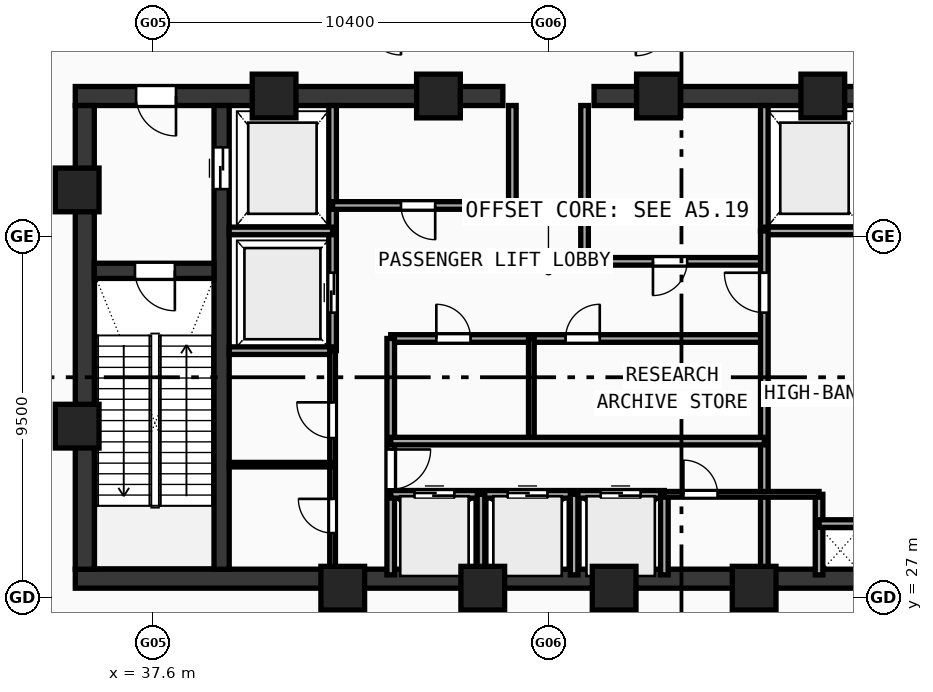
"""IFC4 building model, lengths in metres.
Left out: names, types, materials, properties, quantities, classifications, styles, units other than length and angle.
Written with IfcOpenShell. Run it as: python <this file> out.ifc"""

import sys

from ifc_helpers import new_model, si_unit, direction, frame, frame_2d, origin, origin_with_axes, origin_2d, place, context, subcontext, project, spatial, rectangle, hollow_rectangle, extrude, source, transform, mapped, element, fill, save


model = new_model("IFC4")
c1 = context("Model", 3, precision=1e-05, world=origin(), true_north=direction((0.0, 1.0)))
c2 = subcontext(c1, "Body", "Model", "MODEL_VIEW")
j1 = project(units=[si_unit("LENGTHUNIT", "METRE"), si_unit("PLANEANGLEUNIT", "RADIAN")], contexts=[c1])
p1 = place(None, origin())
s1 = spatial("IfcSite", under=j1, at=p1, CompositionType="ELEMENT")
p2 = place(p1, origin())
s2 = spatial("IfcBuilding", under=s1, at=p2, CompositionType="ELEMENT")
p3 = place(p2, frame((0.0, 0.0, 314.86)))
s3 = spatial("IfcBuildingStorey", under=s2, at=p3, CompositionType="ELEMENT", Elevation=314.86)
p4 = place(p3, frame((35.55, 27.5, 0.0), z_axis=(0.0, 0.0, 1.0), x_axis=(1.0, 0.0, 0.0)))
e1 = element("IfcWall", 1, at=p4, inside=s3, PredefinedType="SHEAR", context=c2, shape_type="SweptSolid", body=[
    extrude(rectangle(XDim=24.9, YDim=0.5, at=frame_2d((12.45, 0.0))), origin(), (0.0, 0.0, 1.0), 5.57),
])
p5 = place(p3, frame((35.55, 40.2, 0.0), z_axis=(0.0, 0.0, 1.0), x_axis=(1.0, 0.0, 0.0)))
e2 = element("IfcWall", 2, at=p5, inside=s3, PredefinedType="SHEAR", context=c2, shape_type="SweptSolid", body=[
    extrude(rectangle(XDim=11.25, YDim=0.5, at=frame_2d((5.625, 0.0))), origin(), (0.0, 0.0, 1.0), 5.57),
])
p6 = place(p5, frame((1.6, 0.0, 0.0)))
e3 = element("IfcOpeningElement", 3, at=p6, cuts=e2, PredefinedType="OPENING", context=c2, shape_type="SweptSolid", body=[
    extrude(rectangle(XDim=1.05, YDim=2.1, at=frame_2d((0.525, 1.05))), frame((0.0, 0.26, 0.0), z_axis=(0.0, -1.0, 0.0), x_axis=(1.0, 0.0, 0.0)), (0.0, 0.0, 1.0), 0.52),
])
p7 = place(p3, frame((49.2, 40.2, 0.0), z_axis=(0.0, 0.0, 1.0), x_axis=(1.0, 0.0, 0.0)))
e4 = element("IfcWall", 4, at=p7, inside=s3, PredefinedType="SHEAR", context=c2, shape_type="SweptSolid", body=[
    extrude(rectangle(XDim=11.25, YDim=0.5, at=frame_2d((5.625, 0.0))), origin(), (0.0, 0.0, 1.0), 5.57),
])
p8 = place(p7, frame((8.6, 0.0, 0.0)))
e5 = element("IfcOpeningElement", 5, at=p8, cuts=e4, PredefinedType="OPENING", context=c2, shape_type="SweptSolid", body=[
    extrude(rectangle(XDim=1.05, YDim=2.1, at=frame_2d((0.525, 1.05))), frame((0.0, 0.26, 0.0), z_axis=(0.0, -1.0, 0.0), x_axis=(1.0, 0.0, 0.0)), (0.0, 0.0, 1.0), 0.52),
])
p9 = place(p3, frame((35.8, 27.75, 0.0), z_axis=(0.0, 0.0, 1.0), x_axis=(0.0, 1.0, 0.0)))
e6 = element("IfcWall", 6, at=p9, inside=s3, PredefinedType="SHEAR", context=c2, shape_type="SweptSolid", body=[
    extrude(rectangle(XDim=12.2, YDim=0.5, at=frame_2d((6.1, 0.0))), origin(), (0.0, 0.0, 1.0), 5.57),
])
p10 = place(p3, frame((39.4, 27.75, 0.0), z_axis=(0.0, 0.0, 1.0), x_axis=(0.0, 1.0, 0.0)))
e7 = element("IfcWall", 7, at=p10, inside=s3, PredefinedType="SHEAR", context=c2, shape_type="SweptSolid", body=[
    extrude(rectangle(XDim=12.2, YDim=0.4, at=frame_2d((6.1, 0.0))), origin(), (0.0, 0.0, 1.0), 5.57),
])
p11 = place(p10, frame((10.0, 0.0, 0.0)))
e8 = element("IfcOpeningElement", 8, at=p11, cuts=e7, PredefinedType="OPENING", context=c2, shape_type="SweptSolid", body=[
    extrude(rectangle(XDim=1.1, YDim=2.1, at=frame_2d((0.55, 1.05))), frame((0.0, 0.21, 0.0), z_axis=(0.0, -1.0, 0.0), x_axis=(1.0, 0.0, 0.0)), (0.0, 0.0, 1.0), 0.42),
])
p12 = place(p3, frame((36.05, 35.6, 0.0), z_axis=(0.0, 0.0, 1.0), x_axis=(1.0, 0.0, 0.0)))
e9 = element("IfcWall", 9, at=p12, inside=s3, PredefinedType="SHEAR", context=c2, shape_type="SweptSolid", body=[
    extrude(rectangle(XDim=3.15, YDim=0.4, at=frame_2d((1.575, 0.0))), origin(), (0.0, 0.0, 1.0), 5.57),
])
p13 = place(p12, frame((1.07, 0.0, 0.0)))
e10 = element("IfcOpeningElement", 10, at=p13, cuts=e9, PredefinedType="OPENING", context=c2, shape_type="SweptSolid", body=[
    extrude(rectangle(XDim=1.05, YDim=2.1, at=frame_2d((0.525, 1.05))), frame((0.0, 0.21, 0.0), z_axis=(0.0, -1.0, 0.0), x_axis=(1.0, 0.0, 0.0)), (0.0, 0.0, 1.0), 0.42),
])
m1 = source(origin(), c2, "Body", "SweptSolid", [
    extrude(hollow_rectangle(XDim=1.15, YDim=1.15, WallThickness=0.048, at=origin_2d()), origin(), (0.0, 0.0, 1.0), 5.83),
])
for number, where, z_axis, x_axis in (
    (11, (42.588, 27.25, -0.26), (0.0, 0.0, 1.0), (1.0, 0.0, 0.0)),
    (12, (46.272, 27.25, -0.26), (0.0, 0.0, 1.0), (1.0, 0.0, 0.0)),
    (13, (49.729, 27.25, -0.26), (0.0, 0.0, 1.0), (1.0, 0.0, 0.0)),
    (14, (53.412, 27.25, -0.26), (0.0, 0.0, 1.0), (1.0, 0.0, 0.0)),
    (15, (55.219, 40.2, -0.26), (0.0, 0.0, 1.0), (1.0, 0.0, 0.0)),
    (16, (50.894, 40.2, -0.26), (0.0, 0.0, 1.0), (1.0, 0.0, 0.0)),
    (17, (45.106, 40.2, -0.26), (0.0, 0.0, 1.0), (1.0, 0.0, 0.0)),
    (18, (40.781, 40.2, -0.26), (0.0, 0.0, 1.0), (1.0, 0.0, 0.0)),
    (19, (35.6, 37.729, -0.26), (0.0, 0.0, 1.0), (1.0, 0.0, 0.0)),
    (20, (35.6, 31.513, -0.26), (0.0, 0.0, 1.0), (1.0, 0.0, 0.0)),
):
    element("IfcColumn", number, at=place(p3, frame(where, z_axis=z_axis, x_axis=x_axis)), inside=s3, PredefinedType="COLUMN", context=c2, shape_type="MappedRepresentation", body=[
        mapped(m1, transform((0.0, 0.0, 0.0), scale=1.0)),
    ])
p14 = place(p3, frame((42.32, 33.5, 0.0), z_axis=(0.0, 0.0, 1.0), x_axis=(0.0, 1.0, 0.0)))
e21 = element("IfcWall", 21, at=p14, inside=s3, PredefinedType="SOLIDWALL", context=c2, shape_type="SweptSolid", body=[
    extrude(rectangle(XDim=6.45, YDim=0.2, at=frame_2d((3.225, 0.0))), origin(), (0.0, 0.0, 1.0), 5.57),
])
p15 = place(p14, frame((1.0, 0.0, 0.0)))
e22 = element("IfcOpeningElement", 22, at=p15, cuts=e21, PredefinedType="OPENING", context=c2, shape_type="SweptSolid", body=[
    extrude(rectangle(XDim=1.05, YDim=2.1, at=frame_2d((0.525, 1.05))), frame((0.0, 0.11, 0.0), z_axis=(0.0, -1.0, 0.0), x_axis=(1.0, 0.0, 0.0)), (0.0, 0.0, 1.0), 0.22),
])
for number, where, z_axis, x_axis in (
    (23, (39.6, 36.65, 0.0), (0.0, 0.0, 1.0), (1.0, 0.0, 0.0)),
    (24, (39.6, 33.5, 0.0), (0.0, 0.0, 1.0), (1.0, 0.0, 0.0)),
):
    element("IfcWall", number, at=place(p3, frame(where, z_axis=z_axis, x_axis=x_axis)), inside=s3, PredefinedType="SOLIDWALL", context=c2, shape_type="SweptSolid", body=[
        extrude(rectangle(XDim=2.72, YDim=0.2, at=frame_2d((1.36, 0.0))), origin(), (0.0, 0.0, 1.0), 5.57),
    ])
p16 = place(p3, frame((53.68, 36.65, 0.0), z_axis=(0.0, 0.0, 1.0), x_axis=(0.0, 1.0, 0.0)))
e25 = element("IfcWall", 25, at=p16, inside=s3, PredefinedType="SOLIDWALL", context=c2, shape_type="SweptSolid", body=[
    extrude(rectangle(XDim=3.3, YDim=0.2, at=frame_2d((1.65, 0.0))), origin(), (0.0, 0.0, 1.0), 5.57),
])
p17 = place(p3, frame((53.68, 36.65, 0.0), z_axis=(0.0, 0.0, 1.0), x_axis=(1.0, 0.0, 0.0)))
e26 = element("IfcWall", 26, at=p17, inside=s3, PredefinedType="SOLIDWALL", context=c2, shape_type="SweptSolid", body=[
    extrude(rectangle(XDim=2.72, YDim=0.2, at=frame_2d((1.36, 0.0))), origin(), (0.0, 0.0, 1.0), 5.57),
])
p18 = place(p3, frame((42.32, 37.32, 0.0), z_axis=(0.0, 0.0, 1.0), x_axis=(1.0, 0.0, 0.0)))
e27 = element("IfcWall", 27, at=p18, inside=s3, PredefinedType="SOLIDWALL", context=c2, shape_type="SweptSolid", body=[
    extrude(rectangle(XDim=4.73, YDim=0.2, at=frame_2d((2.365, 0.0))), origin(), (0.0, 0.0, 1.0), 5.57),
])
p19 = place(p18, frame((1.8, 0.0, 0.0)))
e28 = element("IfcOpeningElement", 28, at=p19, cuts=e27, PredefinedType="OPENING", context=c2, shape_type="SweptSolid", body=[
    extrude(rectangle(XDim=0.9, YDim=2.1, at=frame_2d((0.45, 1.05))), frame((0.0, 0.11, 0.0), z_axis=(0.0, -1.0, 0.0), x_axis=(1.0, 0.0, 0.0)), (0.0, 0.0, 1.0), 0.22),
])
p20 = place(p3, frame((48.95, 35.85, 0.0), z_axis=(0.0, 0.0, 1.0), x_axis=(1.0, 0.0, 0.0)))
e29 = element("IfcWall", 29, at=p20, inside=s3, PredefinedType="SOLIDWALL", context=c2, shape_type="SweptSolid", body=[
    extrude(rectangle(XDim=4.73, YDim=0.2, at=frame_2d((2.365, 0.0))), origin(), (0.0, 0.0, 1.0), 5.57),
])
p21 = place(p20, frame((1.8, 0.0, 0.0)))
e30 = element("IfcOpeningElement", 30, at=p21, cuts=e29, PredefinedType="OPENING", context=c2, shape_type="SweptSolid", body=[
    extrude(rectangle(XDim=0.9, YDim=2.1, at=frame_2d((0.45, 1.05))), frame((0.0, 0.11, 0.0), z_axis=(0.0, -1.0, 0.0), x_axis=(1.0, 0.0, 0.0)), (0.0, 0.0, 1.0), 0.22),
])
p22 = place(p3, frame((47.05, 37.32, 0.0), z_axis=(0.0, 0.0, 1.0), x_axis=(0.0, 1.0, 0.0)))
e31 = element("IfcWall", 31, at=p22, inside=s3, PredefinedType="SOLIDWALL", context=c2, shape_type="SweptSolid", body=[
    extrude(rectangle(XDim=2.63, YDim=0.2, at=frame_2d((1.315, 0.0))), origin(), (0.0, 0.0, 1.0), 5.57),
])
p23 = place(p3, frame((48.95, 35.85, 0.0), z_axis=(0.0, 0.0, 1.0), x_axis=(0.0, 1.0, 0.0)))
e32 = element("IfcWall", 32, at=p23, inside=s3, PredefinedType="SOLIDWALL", context=c2, shape_type="SweptSolid", body=[
    extrude(rectangle(XDim=4.1, YDim=0.2, at=frame_2d((2.05, 0.0))), origin(), (0.0, 0.0, 1.0), 5.57),
])
p24 = place(p3, frame((43.85, 33.82, 0.0), z_axis=(0.0, 0.0, 1.0), x_axis=(1.0, 0.0, 0.0)))
e33 = element("IfcWall", 33, at=p24, inside=s3, PredefinedType="SOLIDWALL", context=c2, shape_type="SweptSolid", body=[
    extrude(rectangle(XDim=9.83, YDim=0.2, at=frame_2d((4.915, 0.0))), origin(), (0.0, 0.0, 1.0), 5.57),
])
p25 = place(p24, frame((1.2, 0.0, 0.0)))
e34 = element("IfcOpeningElement", 34, at=p25, cuts=e33, PredefinedType="OPENING", context=c2, shape_type="SweptSolid", body=[
    extrude(rectangle(XDim=0.9, YDim=2.1, at=frame_2d((0.45, 1.05))), frame((0.0, 0.11, 0.0), z_axis=(0.0, -1.0, 0.0), x_axis=(1.0, 0.0, 0.0)), (0.0, 0.0, 1.0), 0.22),
])
p26 = place(p24, frame((4.6, 0.0, 0.0)))
e35 = element("IfcOpeningElement", 35, at=p26, cuts=e33, PredefinedType="OPENING", context=c2, shape_type="SweptSolid", body=[
    extrude(rectangle(XDim=0.9, YDim=2.1, at=frame_2d((0.45, 1.05))), frame((0.0, 0.11, 0.0), z_axis=(0.0, -1.0, 0.0), x_axis=(1.0, 0.0, 0.0)), (0.0, 0.0, 1.0), 0.22),
])
p27 = place(p3, frame((43.85, 27.6, 0.0), z_axis=(0.0, 0.0, 1.0), x_axis=(0.0, 1.0, 0.0)))
e36 = element("IfcWall", 36, at=p27, inside=s3, PredefinedType="SOLIDWALL", context=c2, shape_type="SweptSolid", body=[
    extrude(rectangle(XDim=6.22, YDim=0.2, at=frame_2d((3.11, 0.0))), origin(), (0.0, 0.0, 1.0), 5.57),
])
p28 = place(p27, frame((2.25, 0.0, 0.0)))
e37 = element("IfcOpeningElement", 37, at=p28, cuts=e36, PredefinedType="OPENING", context=c2, shape_type="SweptSolid", body=[
    extrude(rectangle(XDim=1.05, YDim=2.1, at=frame_2d((0.525, 1.05))), frame((0.0, 0.11, 0.0), z_axis=(0.0, -1.0, 0.0), x_axis=(1.0, 0.0, 0.0)), (0.0, 0.0, 1.0), 0.22),
])
p29 = place(p3, frame((53.68, 27.6, 0.0), z_axis=(0.0, 0.0, 1.0), x_axis=(0.0, 1.0, 0.0)))
e38 = element("IfcWall", 38, at=p29, inside=s3, PredefinedType="SOLIDWALL", context=c2, shape_type="SweptSolid", body=[
    extrude(rectangle(XDim=9.05, YDim=0.2, at=frame_2d((4.525, 0.0))), origin(), (0.0, 0.0, 1.0), 2.22),
])
p30 = place(p29, frame((6.9, 0.0, 0.0)))
e39 = element("IfcOpeningElement", 39, at=p30, cuts=e38, PredefinedType="OPENING", context=c2, shape_type="SweptSolid", body=[
    extrude(rectangle(XDim=1.05, YDim=2.1, at=frame_2d((0.525, 1.05))), frame((0.0, 0.11, 0.0), z_axis=(0.0, -1.0, 0.0), x_axis=(1.0, 0.0, 0.0)), (0.0, 0.0, 1.0), 0.22),
])
p31 = place(p3, frame((47.55, 31.12, 0.0), z_axis=(0.0, 0.0, 1.0), x_axis=(0.0, 1.0, 0.0)))
e40 = element("IfcWall", 40, at=p31, inside=s3, PredefinedType="PARTITIONING", context=c2, shape_type="SweptSolid", body=[
    extrude(rectangle(XDim=2.7, YDim=0.15, at=frame_2d((1.35, 0.0))), origin(), (0.0, 0.0, 1.0), 5.57),
])
p32 = place(p3, frame((43.85, 29.72, 0.0), z_axis=(0.0, 0.0, 1.0), x_axis=(1.0, 0.0, 0.0)))
e41 = element("IfcWall", 41, at=p32, inside=s3, PredefinedType="SOLIDWALL", context=c2, shape_type="SweptSolid", body=[
    extrude(rectangle(XDim=7.2, YDim=0.2, at=frame_2d((3.6, 0.0))), origin(), (0.0, 0.0, 1.0), 5.57),
])
p33 = place(p32, frame((0.625, 0.0, 0.0)))
e42 = element("IfcOpeningElement", 42, at=p33, cuts=e41, PredefinedType="OPENING", context=c2, shape_type="SweptSolid", body=[
    extrude(rectangle(XDim=1.05, YDim=2.1, at=frame_2d((0.525, 1.05))), frame((0.0, 0.11, 0.0), z_axis=(0.0, -1.0, 0.0), x_axis=(1.0, 0.0, 0.0)), (0.0, 0.0, 1.0), 0.22),
])
p34 = place(p32, frame((3.075, 0.0, 0.0)))
e43 = element("IfcOpeningElement", 43, at=p34, cuts=e41, PredefinedType="OPENING", context=c2, shape_type="SweptSolid", body=[
    extrude(rectangle(XDim=1.05, YDim=2.1, at=frame_2d((0.525, 1.05))), frame((0.0, 0.11, 0.0), z_axis=(0.0, -1.0, 0.0), x_axis=(1.0, 0.0, 0.0)), (0.0, 0.0, 1.0), 0.22),
])
p35 = place(p32, frame((5.525, 0.0, 0.0)))
e44 = element("IfcOpeningElement", 44, at=p35, cuts=e41, PredefinedType="OPENING", context=c2, shape_type="SweptSolid", body=[
    extrude(rectangle(XDim=1.05, YDim=2.1, at=frame_2d((0.525, 1.05))), frame((0.0, 0.11, 0.0), z_axis=(0.0, -1.0, 0.0), x_axis=(1.0, 0.0, 0.0)), (0.0, 0.0, 1.0), 0.22),
])
p36 = place(p3, frame((51.05, 27.6, 0.0), z_axis=(0.0, 0.0, 1.0), x_axis=(0.0, 1.0, 0.0)))
e45 = element("IfcWall", 45, at=p36, inside=s3, PredefinedType="SOLIDWALL", context=c2, shape_type="SweptSolid", body=[
    extrude(rectangle(XDim=2.12, YDim=0.2, at=frame_2d((1.06, 0.0))), origin(), (0.0, 0.0, 1.0), 5.57),
])
p37 = place(p3, frame((43.85, 31.12, 0.0), z_axis=(0.0, 0.0, 1.0), x_axis=(1.0, 0.0, 0.0)))
e46 = element("IfcWall", 46, at=p37, inside=s3, PredefinedType="SOLIDWALL", context=c2, shape_type="SweptSolid", body=[
    extrude(rectangle(XDim=9.83, YDim=0.2, at=frame_2d((4.915, 0.0))), origin(), (0.0, 0.0, 1.0), 5.57),
])
p38 = place(p3, frame((46.225, 27.6, 0.0), z_axis=(0.0, 0.0, 1.0), x_axis=(0.0, 1.0, 0.0)))
e47 = element("IfcWall", 47, at=p38, inside=s3, PredefinedType="SOLIDWALL", context=c2, shape_type="SweptSolid", body=[
    extrude(rectangle(XDim=2.12, YDim=0.2, at=frame_2d((1.06, 0.0))), origin(), (0.0, 0.0, 1.0), 2.22),
])
for number, where, z_axis, x_axis in (
    (48, (48.675, 27.6, 0.0), (0.0, 0.0, 1.0), (0.0, 1.0, 0.0)),
    (49, (55.12, 27.6, 0.0), (0.0, 0.0, 1.0), (0.0, 1.0, 0.0)),
):
    element("IfcWall", number, at=place(p3, frame(where, z_axis=z_axis, x_axis=x_axis)), inside=s3, PredefinedType="SOLIDWALL", context=c2, shape_type="SweptSolid", body=[
        extrude(rectangle(XDim=2.12, YDim=0.2, at=frame_2d((1.06, 0.0))), origin(), (0.0, 0.0, 1.0), 5.57),
    ])
p39 = place(p3, frame((55.12, 28.95, 0.0), z_axis=(0.0, 0.0, 1.0), x_axis=(1.0, 0.0, 0.0)))
e50 = element("IfcWall", 50, at=p39, inside=s3, PredefinedType="SOLIDWALL", context=c2, shape_type="SweptSolid", body=[
    extrude(rectangle(XDim=1.28, YDim=0.2, at=frame_2d((0.64, 0.0))), origin(), (0.0, 0.0, 1.0), 5.57),
])
p40 = place(p3, frame((42.32, 27.6, 0.0), z_axis=(0.0, 0.0, 1.0), x_axis=(0.0, 1.0, 0.0)))
e51 = element("IfcWall", 51, at=p40, inside=s3, PredefinedType="PARTITIONING", context=c2, shape_type="SweptSolid", body=[
    extrude(rectangle(XDim=5.9, YDim=0.15, at=frame_2d((2.95, 0.0))), origin(), (0.0, 0.0, 1.0), 2.22),
])
p41 = place(p40, frame((1.1, 0.0, 0.0)))
e52 = element("IfcOpeningElement", 52, at=p41, cuts=e51, PredefinedType="OPENING", context=c2, shape_type="SweptSolid", body=[
    extrude(rectangle(XDim=0.9, YDim=2.1, at=frame_2d((0.45, 1.05))), frame((0.0, 0.085, 0.0), z_axis=(0.0, -1.0, 0.0), x_axis=(1.0, 0.0, 0.0)), (0.0, 0.0, 1.0), 0.17),
])
p42 = place(p40, frame((3.6, 0.0, 0.0)))
e53 = element("IfcOpeningElement", 53, at=p42, cuts=e51, PredefinedType="OPENING", context=c2, shape_type="SweptSolid", body=[
    extrude(rectangle(XDim=0.94, YDim=2.1, at=frame_2d((0.47, 1.05))), frame((0.0, 0.085, 0.0), z_axis=(0.0, -1.0, 0.0), x_axis=(1.0, 0.0, 0.0)), (0.0, 0.0, 1.0), 0.17),
])
p43 = place(p3, frame((51.05, 29.72, 0.0), z_axis=(0.0, 0.0, 1.0), x_axis=(1.0, 0.0, 0.0)))
e54 = element("IfcWall", 54, at=p43, inside=s3, PredefinedType="PARTITIONING", context=c2, shape_type="SweptSolid", body=[
    extrude(rectangle(XDim=4.07, YDim=0.15, at=frame_2d((2.035, 0.0))), origin(), (0.0, 0.0, 1.0), 5.57),
])
p44 = place(p43, frame((0.5, 0.0, 0.0)))
e55 = element("IfcOpeningElement", 55, at=p44, cuts=e54, PredefinedType="OPENING", context=c2, shape_type="SweptSolid", body=[
    extrude(rectangle(XDim=0.9, YDim=2.1, at=frame_2d((0.45, 1.05))), frame((0.0, 0.085, 0.0), z_axis=(0.0, -1.0, 0.0), x_axis=(1.0, 0.0, 0.0)), (0.0, 0.0, 1.0), 0.17),
])
p45 = place(p3, frame((39.6, 30.5, 0.0), z_axis=(0.0, 0.0, 1.0), x_axis=(1.0, 0.0, 0.0)))
e56 = element("IfcWall", 56, at=p45, inside=s3, PredefinedType="PARTITIONING", context=c2, shape_type="SweptSolid", body=[
    extrude(rectangle(XDim=2.72, YDim=0.12, at=frame_2d((1.36, 0.0))), origin(), (0.0, 0.0, 1.0), 5.57),
])
m2 = source(origin(), c2, "Body", "SweptSolid", [
    extrude(rectangle(XDim=1.05, YDim=2.1, at=frame_2d((0.525, 1.05))), frame((0.0, 0.025, 0.0), z_axis=(0.0, -1.0, 0.0), x_axis=(1.0, 0.0, 0.0)), (0.0, 0.0, 1.0), 0.05),
])
p46 = place(p13, frame((1.05, 0.0, 0.0), z_axis=(0.0, 0.0, 1.0), x_axis=(-1.0, 0.0, 0.0)))
e57 = element("IfcDoor", 57, at=p46, inside=s3, OperationType="SINGLE_SWING_LEFT", PredefinedType="DOOR", context=c2, shape_type="MappedRepresentation", body=[
    mapped(m2, transform((0.0, 0.0, 0.0), scale=1.0)),
])
fill(e10, e57)
p47 = place(p6, frame((1.05, 0.0, 0.0), z_axis=(0.0, 0.0, 1.0), x_axis=(-1.0, 0.0, 0.0)))
e58 = element("IfcDoor", 58, at=p47, inside=s3, OperationType="SINGLE_SWING_LEFT", PredefinedType="DOOR", context=c2, shape_type="MappedRepresentation", body=[
    mapped(m2, transform((0.0, 0.0, 0.0), scale=1.0)),
])
fill(e3, e58)
m3 = source(origin(), c2, "Body", "SweptSolid", [
    extrude(rectangle(XDim=1.1, YDim=2.1, at=frame_2d((0.55, 1.05))), frame((0.0, 0.025, 0.0), z_axis=(0.0, -1.0, 0.0), x_axis=(1.0, 0.0, 0.0)), (0.0, 0.0, 1.0), 0.05),
])
p48 = place(p11, frame((1.1, 0.0, 0.0), z_axis=(0.0, 0.0, 1.0), x_axis=(-1.0, 0.0, 0.0)))
e59 = element("IfcDoor", 59, at=p48, inside=s3, OperationType="DOUBLE_DOOR_SLIDING", PredefinedType="DOOR", context=c2, shape_type="MappedRepresentation", body=[
    mapped(m3, transform((0.0, 0.0, 0.0), scale=1.0)),
])
fill(e8, e59)
p49 = place(p15, origin_with_axes())
e60 = element("IfcDoor", 60, at=p49, inside=s3, OperationType="DOUBLE_DOOR_SLIDING", PredefinedType="DOOR", context=c2, shape_type="MappedRepresentation", body=[
    mapped(m2, transform((0.0, 0.0, 0.0), scale=1.0)),
])
fill(e22, e60)
m4 = source(origin(), c2, "Body", "SweptSolid", [
    extrude(rectangle(XDim=0.9, YDim=2.1, at=frame_2d((0.45, 1.05))), frame((0.0, 0.025, 0.0), z_axis=(0.0, -1.0, 0.0), x_axis=(1.0, 0.0, 0.0)), (0.0, 0.0, 1.0), 0.05),
])
p50 = place(p19, frame((0.9, 0.0, 0.0), z_axis=(0.0, 0.0, 1.0), x_axis=(-1.0, 0.0, 0.0)))
e61 = element("IfcDoor", 61, at=p50, inside=s3, OperationType="SINGLE_SWING_LEFT", PredefinedType="DOOR", context=c2, shape_type="MappedRepresentation", body=[
    mapped(m4, transform((0.0, 0.0, 0.0), scale=1.0)),
])
fill(e28, e61)
p51 = place(p21, frame((0.9, 0.0, 0.0), z_axis=(0.0, 0.0, 1.0), x_axis=(-1.0, 0.0, 0.0)))
e62 = element("IfcDoor", 62, at=p51, inside=s3, OperationType="SINGLE_SWING_RIGHT", PredefinedType="DOOR", context=c2, shape_type="MappedRepresentation", body=[
    mapped(m4, transform((0.0, 0.0, 0.0), scale=1.0)),
])
fill(e30, e62)
p52 = place(p25, origin_with_axes())
e63 = element("IfcDoor", 63, at=p52, inside=s3, OperationType="SINGLE_SWING_LEFT", PredefinedType="DOOR", context=c2, shape_type="MappedRepresentation", body=[
    mapped(m4, transform((0.0, 0.0, 0.0), scale=1.0)),
])
fill(e34, e63)
p53 = place(p26, origin_with_axes())
e64 = element("IfcDoor", 64, at=p53, inside=s3, OperationType="SINGLE_SWING_RIGHT", PredefinedType="DOOR", context=c2, shape_type="MappedRepresentation", body=[
    mapped(m4, transform((0.0, 0.0, 0.0), scale=1.0)),
])
fill(e35, e64)
p54 = place(p28, frame((1.05, 0.0, 0.0), z_axis=(0.0, 0.0, 1.0), x_axis=(-1.0, 0.0, 0.0)))
e65 = element("IfcDoor", 65, at=p54, inside=s3, OperationType="SINGLE_SWING_LEFT", PredefinedType="DOOR", context=c2, shape_type="MappedRepresentation", body=[
    mapped(m2, transform((0.0, 0.0, 0.0), scale=1.0)),
])
fill(e37, e65)
p55 = place(p30, origin_with_axes())
e66 = element("IfcDoor", 66, at=p55, inside=s3, OperationType="SINGLE_SWING_RIGHT", PredefinedType="DOOR", context=c2, shape_type="MappedRepresentation", body=[
    mapped(m2, transform((0.0, 0.0, 0.0), scale=1.0)),
])
fill(e39, e66)
p56 = place(p33, origin_with_axes())
e67 = element("IfcDoor", 67, at=p56, inside=s3, OperationType="DOUBLE_DOOR_SLIDING", PredefinedType="DOOR", context=c2, shape_type="MappedRepresentation", body=[
    mapped(m2, transform((0.0, 0.0, 0.0), scale=1.0)),
])
fill(e42, e67)
p57 = place(p34, origin_with_axes())
e68 = element("IfcDoor", 68, at=p57, inside=s3, OperationType="DOUBLE_DOOR_SLIDING", PredefinedType="DOOR", context=c2, shape_type="MappedRepresentation", body=[
    mapped(m2, transform((0.0, 0.0, 0.0), scale=1.0)),
])
fill(e43, e68)
p58 = place(p35, origin_with_axes())
e69 = element("IfcDoor", 69, at=p58, inside=s3, OperationType="DOUBLE_DOOR_SLIDING", PredefinedType="DOOR", context=c2, shape_type="MappedRepresentation", body=[
    mapped(m2, transform((0.0, 0.0, 0.0), scale=1.0)),
])
fill(e44, e69)
p59 = place(p41, origin_with_axes())
e70 = element("IfcDoor", 70, at=p59, inside=s3, OperationType="SINGLE_SWING_RIGHT", PredefinedType="DOOR", context=c2, shape_type="MappedRepresentation", body=[
    mapped(m4, transform((0.0, 0.0, 0.0), scale=1.0)),
])
fill(e52, e70)
m5 = source(origin(), c2, "Body", "SweptSolid", [
    extrude(rectangle(XDim=0.94, YDim=2.1, at=frame_2d((0.47, 1.05))), frame((0.0, 0.025, 0.0), z_axis=(0.0, -1.0, 0.0), x_axis=(1.0, 0.0, 0.0)), (0.0, 0.0, 1.0), 0.05),
])
p60 = place(p42, origin_with_axes())
e71 = element("IfcDoor", 71, at=p60, inside=s3, OperationType="SINGLE_SWING_RIGHT", PredefinedType="DOOR", context=c2, shape_type="MappedRepresentation", body=[
    mapped(m5, transform((0.0, 0.0, 0.0), scale=1.0)),
])
fill(e53, e71)
p61 = place(p44, origin_with_axes())
e72 = element("IfcDoor", 72, at=p61, inside=s3, OperationType="SINGLE_SWING_LEFT", PredefinedType="DOOR", context=c2, shape_type="MappedRepresentation", body=[
    mapped(m4, transform((0.0, 0.0, 0.0), scale=1.0)),
])
fill(e55, e72)
save(model, sys.argv[1])
